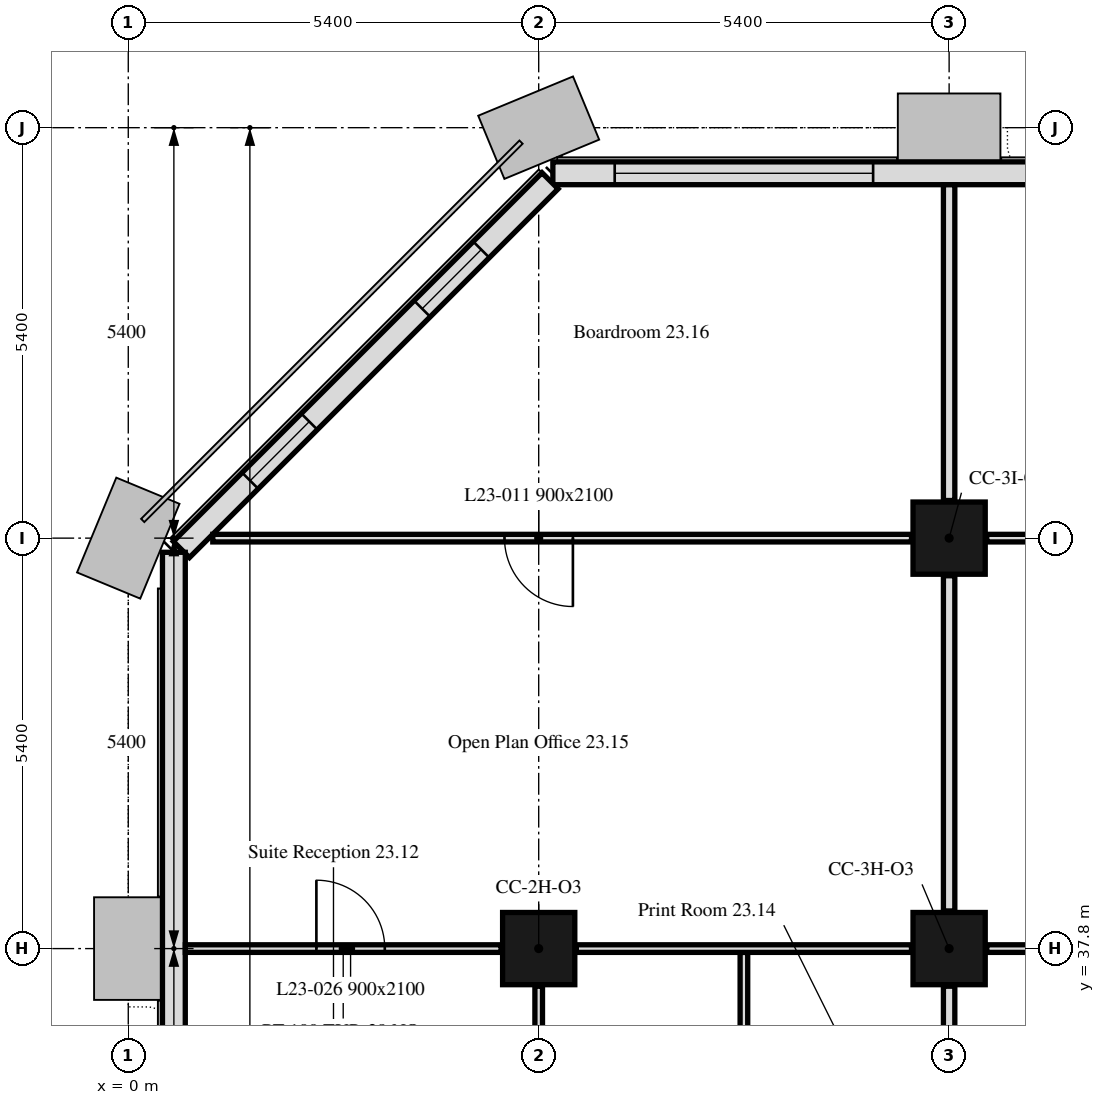
"""IFC4 building model, lengths in metres.
Left out: names, types, materials, properties, quantities, classifications, styles, units other than length and angle.
Written with IfcOpenShell. Run it as: python <this file> out.ifc"""

import sys

from ifc_helpers import new_model, si_unit, direction, frame, frame_2d, origin, origin_2d, place, context, subcontext, project, spatial, rectangle, extrude, element, fill, save


model = new_model("IFC4")
c1 = context("Model", 3, precision=1e-05, world=origin(), true_north=direction((0.0, 1.0)))
c2 = subcontext(c1, "Body", "Model", "MODEL_VIEW")
j1 = project(units=[si_unit("LENGTHUNIT", "METRE"), si_unit("PLANEANGLEUNIT", "RADIAN")], contexts=[c1])
p1 = place(None, origin())
s1 = spatial("IfcSite", under=j1, at=p1, CompositionType="ELEMENT")
p2 = place(p1, origin())
s2 = spatial("IfcBuilding", under=s1, at=p2, CompositionType="ELEMENT")
p3 = place(p2, frame((0.0, 0.0, 99.2)))
s3 = spatial("IfcBuildingStorey", under=s2, at=p3, CompositionType="ELEMENT", Elevation=99.2)
for number, where, z_axis, x_axis in (
    (1, (5.4, 37.8, 0.0), (0.0, 0.0, 1.0), (1.0, 0.0, 0.0)),
    (2, (10.8, 37.8, 0.0), (0.0, 0.0, 1.0), (1.0, 0.0, 0.0)),
    (3, (10.8, 43.2, 0.0), (0.0, 0.0, 1.0), (1.0, 0.0, 0.0)),
):
    element("IfcColumn", number, at=place(p3, frame(where, z_axis=z_axis, x_axis=x_axis)), inside=s3, PredefinedType="COLUMN", context=c2, shape_type="SweptSolid", body=[
        extrude(rectangle(XDim=0.95, YDim=0.95, at=origin_2d()), origin(), (0.0, 0.0, 1.0), 3.5),
    ])
p4 = place(p3, frame((37.614, 48.0, 0.0), z_axis=(0.0, 0.0, 1.0), x_axis=(-1.0, 0.0, 0.0)))
e4 = element("IfcWall", 4, at=p4, inside=s3, PredefinedType="SOLIDWALL", context=c2, shape_type="SweptSolid", body=[
    extrude(rectangle(XDim=32.027, YDim=0.3, at=frame_2d((16.014, 0.0))), origin(), (0.0, 0.0, 1.0), 3.5),
])
p5 = place(p4, frame((27.814, 0.0, 0.9)))
e5 = element("IfcOpeningElement", 5, at=p5, cuts=e4, PredefinedType="OPENING", context=c2, shape_type="SweptSolid", body=[
    extrude(rectangle(XDim=3.4, YDim=1.7, at=frame_2d((1.7, 0.85))), frame((0.0, 0.16, 0.0), z_axis=(0.0, -1.0, 0.0), x_axis=(1.0, 0.0, 0.0)), (0.0, 0.0, 1.0), 0.32),
])
p6 = place(p3, frame((5.55, 47.901, 0.0), z_axis=(0.0, 0.0, 1.0), x_axis=(-0.707106781187, -0.707106781187, 0.0)))
e6 = element("IfcWall", 6, at=p6, inside=s3, PredefinedType="SOLIDWALL", context=c2, shape_type="SweptSolid", body=[
    extrude(rectangle(XDim=6.86, YDim=0.3, at=frame_2d((3.43, 0.0))), origin(), (0.0, 0.0, 1.0), 3.5),
])
p7 = place(p6, frame((1.28, 0.0, 0.9)))
e7 = element("IfcOpeningElement", 7, at=p7, cuts=e6, PredefinedType="OPENING", context=c2, shape_type="SweptSolid", body=[
    extrude(rectangle(XDim=1.1, YDim=1.7, at=frame_2d((0.55, 0.85))), frame((0.0, 0.16, 0.0), z_axis=(0.0, -1.0, 0.0), x_axis=(1.0, 0.0, 0.0)), (0.0, 0.0, 1.0), 0.32),
])
p8 = place(p6, frame((4.48, 0.0, 0.9)))
e8 = element("IfcOpeningElement", 8, at=p8, cuts=e6, PredefinedType="OPENING", context=c2, shape_type="SweptSolid", body=[
    extrude(rectangle(XDim=1.1, YDim=1.7, at=frame_2d((0.55, 0.85))), frame((0.0, 0.16, 0.0), z_axis=(0.0, -1.0, 0.0), x_axis=(1.0, 0.0, 0.0)), (0.0, 0.0, 1.0), 0.32),
])
p9 = place(p3, frame((0.6, 43.014, 0.0), z_axis=(0.0, 0.0, 1.0), x_axis=(0.0, -1.0, 0.0)))
e9 = element("IfcWall", 9, at=p9, inside=s3, PredefinedType="SOLIDWALL", context=c2, shape_type="SweptSolid", body=[
    extrude(rectangle(XDim=32.027, YDim=0.3, at=frame_2d((16.014, 0.0))), origin(), (0.0, 0.0, 1.0), 3.5),
])
p10 = place(p9, frame((28.164, 0.0, 0.9)))
e10 = element("IfcOpeningElement", 10, at=p10, cuts=e9, PredefinedType="OPENING", context=c2, shape_type="SweptSolid", body=[
    extrude(rectangle(XDim=1.1, YDim=1.7, at=frame_2d((0.55, 0.85))), frame((0.0, 0.16, 0.0), z_axis=(0.0, -1.0, 0.0), x_axis=(1.0, 0.0, 0.0)), (0.0, 0.0, 1.0), 0.32),
])
p11 = place(p9, frame((29.764, 0.0, 0.9)))
e11 = element("IfcOpeningElement", 11, at=p11, cuts=e9, PredefinedType="OPENING", context=c2, shape_type="SweptSolid", body=[
    extrude(rectangle(XDim=1.1, YDim=1.7, at=frame_2d((0.55, 0.85))), frame((0.0, 0.16, 0.0), z_axis=(0.0, -1.0, 0.0), x_axis=(1.0, 0.0, 0.0)), (0.0, 0.0, 1.0), 0.32),
])
p12 = place(p3, frame((0.751, 37.8, 0.0), z_axis=(0.0, 0.0, 1.0), x_axis=(1.0, 0.0, 0.0)))
e12 = element("IfcWall", 12, at=p12, inside=s3, PredefinedType="PARTITIONING", context=c2, shape_type="SweptSolid", body=[
    extrude(rectangle(XDim=4.154, YDim=0.1, at=frame_2d((2.077, 0.0))), origin(), (0.0, 0.0, 1.0), 2.75),
])
p13 = place(p12, frame((1.724, 0.0, 0.0)))
e13 = element("IfcOpeningElement", 13, at=p13, cuts=e12, PredefinedType="OPENING", context=c2, shape_type="SweptSolid", body=[
    extrude(rectangle(XDim=0.9, YDim=2.1, at=frame_2d((0.45, 1.05))), frame((0.0, 0.05, 0.0), z_axis=(0.0, -1.0, 0.0), x_axis=(1.0, 0.0, 0.0)), (0.0, 0.0, 1.0), 0.1),
])
p14 = place(p3, frame((5.4, 37.305, 0.0), z_axis=(0.0, 0.0, 1.0), x_axis=(0.0, -1.0, 0.0)))
e14 = element("IfcWall", 14, at=p14, inside=s3, PredefinedType="PARTITIONING", context=c2, shape_type="SweptSolid", body=[
    extrude(rectangle(XDim=2.13, YDim=0.1, at=frame_2d((1.065, 0.0))), origin(), (0.0, 0.0, 1.0), 3.5),
])
p15 = place(p3, frame((8.1, 35.175, 0.0), z_axis=(0.0, 0.0, 1.0), x_axis=(0.0, 1.0, 0.0)))
e15 = element("IfcWall", 15, at=p15, inside=s3, PredefinedType="PARTITIONING", context=c2, shape_type="SweptSolid", body=[
    extrude(rectangle(XDim=2.575, YDim=0.1, at=frame_2d((1.288, 0.0))), origin(), (0.0, 0.0, 1.0), 3.5),
])
p16 = place(p3, frame((10.8, 35.175, 0.0), z_axis=(0.0, 0.0, 1.0), x_axis=(0.0, 1.0, 0.0)))
e16 = element("IfcWall", 16, at=p16, inside=s3, PredefinedType="PARTITIONING", context=c2, shape_type="SweptSolid", body=[
    extrude(rectangle(XDim=2.13, YDim=0.15, at=frame_2d((1.065, 0.0))), origin(), (0.0, 0.0, 1.0), 2.75),
])
p17 = place(p3, frame((10.305, 37.8, 0.0), z_axis=(0.0, 0.0, 1.0), x_axis=(-1.0, 0.0, 0.0)))
e17 = element("IfcWall", 17, at=p17, inside=s3, PredefinedType="PARTITIONING", context=c2, shape_type="SweptSolid", body=[
    extrude(rectangle(XDim=4.41, YDim=0.1, at=frame_2d((2.205, 0.0))), origin(), (0.0, 0.0, 1.0), 2.75),
])
p18 = place(p3, frame((10.305, 43.2, 0.0), z_axis=(0.0, 0.0, 1.0), x_axis=(-1.0, 0.0, 0.0)))
e18 = element("IfcWall", 18, at=p18, inside=s3, PredefinedType="PARTITIONING", context=c2, shape_type="SweptSolid", body=[
    extrude(rectangle(XDim=9.193, YDim=0.1, at=frame_2d((4.596, 0.0))), origin(), (0.0, 0.0, 1.0), 3.5),
])
p19 = place(p18, frame((4.455, 0.0, 0.0)))
e19 = element("IfcOpeningElement", 19, at=p19, cuts=e18, PredefinedType="OPENING", context=c2, shape_type="SweptSolid", body=[
    extrude(rectangle(XDim=0.9, YDim=2.1, at=frame_2d((0.45, 1.05))), frame((0.0, 0.05, 0.0), z_axis=(0.0, -1.0, 0.0), x_axis=(1.0, 0.0, 0.0)), (0.0, 0.0, 1.0), 0.1),
])
p20 = place(p3, frame((10.8, 38.295, 0.0), z_axis=(0.0, 0.0, 1.0), x_axis=(0.0, 1.0, 0.0)))
e20 = element("IfcWall", 20, at=p20, inside=s3, PredefinedType="PARTITIONING", context=c2, shape_type="SweptSolid", body=[
    extrude(rectangle(XDim=4.41, YDim=0.15, at=frame_2d((2.205, 0.0))), origin(), (0.0, 0.0, 1.0), 2.75),
])
p21 = place(p3, frame((10.8, 43.695, 0.0), z_axis=(0.0, 0.0, 1.0), x_axis=(0.0, 1.0, 0.0)))
e21 = element("IfcWall", 21, at=p21, inside=s3, PredefinedType="PARTITIONING", context=c2, shape_type="SweptSolid", body=[
    extrude(rectangle(XDim=4.154, YDim=0.15, at=frame_2d((2.077, 0.0))), origin(), (0.0, 0.0, 1.0), 2.75),
])
p22 = place(p3, frame((15.705, 37.8, 0.0), z_axis=(0.0, 0.0, 1.0), x_axis=(-1.0, 0.0, 0.0)))
e22 = element("IfcWall", 22, at=p22, inside=s3, PredefinedType="PARTITIONING", context=c2, shape_type="SweptSolid", body=[
    extrude(rectangle(XDim=4.41, YDim=0.1, at=frame_2d((2.205, 0.0))), origin(), (0.0, 0.0, 1.0), 2.75),
])
p23 = place(p22, frame((1.755, 0.0, 0.0)))
e23 = element("IfcOpeningElement", 23, at=p23, cuts=e22, PredefinedType="OPENING", context=c2, shape_type="SweptSolid", body=[
    extrude(rectangle(XDim=0.9, YDim=2.1, at=frame_2d((0.45, 1.05))), frame((0.0, 0.05, 0.0), z_axis=(0.0, -1.0, 0.0), x_axis=(1.0, 0.0, 0.0)), (0.0, 0.0, 1.0), 0.1),
])
p24 = place(p3, frame((15.705, 43.2, 0.0), z_axis=(0.0, 0.0, 1.0), x_axis=(-1.0, 0.0, 0.0)))
e24 = element("IfcWall", 24, at=p24, inside=s3, PredefinedType="PARTITIONING", context=c2, shape_type="SweptSolid", body=[
    extrude(rectangle(XDim=4.41, YDim=0.1, at=frame_2d((2.205, 0.0))), origin(), (0.0, 0.0, 1.0), 3.5),
])
p25 = place(p24, frame((1.755, 0.0, 0.0)))
e25 = element("IfcOpeningElement", 25, at=p25, cuts=e24, PredefinedType="OPENING", context=c2, shape_type="SweptSolid", body=[
    extrude(rectangle(XDim=0.9, YDim=2.1, at=frame_2d((0.45, 1.05))), frame((0.0, 0.05, 0.0), z_axis=(0.0, -1.0, 0.0), x_axis=(1.0, 0.0, 0.0)), (0.0, 0.0, 1.0), 0.1),
])
p26 = place(p5, origin())
e26 = element("IfcWindow", 26, at=p26, inside=s3, PartitioningType="SINGLE_PANEL", PredefinedType="WINDOW", context=c2, shape_type="SweptSolid", body=[
    extrude(rectangle(XDim=3.4, YDim=1.7, at=frame_2d((1.7, 0.85))), frame((0.0, 0.03, 0.0), z_axis=(0.0, -1.0, 0.0), x_axis=(1.0, 0.0, 0.0)), (0.0, 0.0, 1.0), 0.06),
])
fill(e5, e26)
p27 = place(p7, origin())
e27 = element("IfcWindow", 27, at=p27, inside=s3, PartitioningType="SINGLE_PANEL", PredefinedType="WINDOW", context=c2, shape_type="SweptSolid", body=[
    extrude(rectangle(XDim=1.1, YDim=1.7, at=frame_2d((0.55, 0.85))), frame((0.0, 0.03, 0.0), z_axis=(0.0, -1.0, 0.0), x_axis=(1.0, 0.0, 0.0)), (0.0, 0.0, 1.0), 0.06),
])
fill(e7, e27)
p28 = place(p8, origin())
e28 = element("IfcWindow", 28, at=p28, inside=s3, PartitioningType="SINGLE_PANEL", PredefinedType="WINDOW", context=c2, shape_type="SweptSolid", body=[
    extrude(rectangle(XDim=1.1, YDim=1.7, at=frame_2d((0.55, 0.85))), frame((0.0, 0.03, 0.0), z_axis=(0.0, -1.0, 0.0), x_axis=(1.0, 0.0, 0.0)), (0.0, 0.0, 1.0), 0.06),
])
fill(e8, e28)
p29 = place(p19, origin())
e29 = element("IfcDoor", 29, at=p29, inside=s3, OperationType="SINGLE_SWING_LEFT", PredefinedType="DOOR", context=c2, shape_type="SweptSolid", body=[
    extrude(rectangle(XDim=0.9, YDim=2.1, at=frame_2d((0.45, 1.05))), frame((0.0, 0.025, 0.0), z_axis=(0.0, -1.0, 0.0), x_axis=(1.0, 0.0, 0.0)), (0.0, 0.0, 1.0), 0.05),
])
fill(e19, e29)
p30 = place(p13, origin())
e30 = element("IfcDoor", 30, at=p30, inside=s3, OperationType="SINGLE_SWING_RIGHT", PredefinedType="DOOR", context=c2, shape_type="SweptSolid", body=[
    extrude(rectangle(XDim=0.9, YDim=2.1, at=frame_2d((0.45, 1.05))), frame((0.0, 0.025, 0.0), z_axis=(0.0, -1.0, 0.0), x_axis=(1.0, 0.0, 0.0)), (0.0, 0.0, 1.0), 0.05),
])
fill(e13, e30)
save(model, sys.argv[1])
